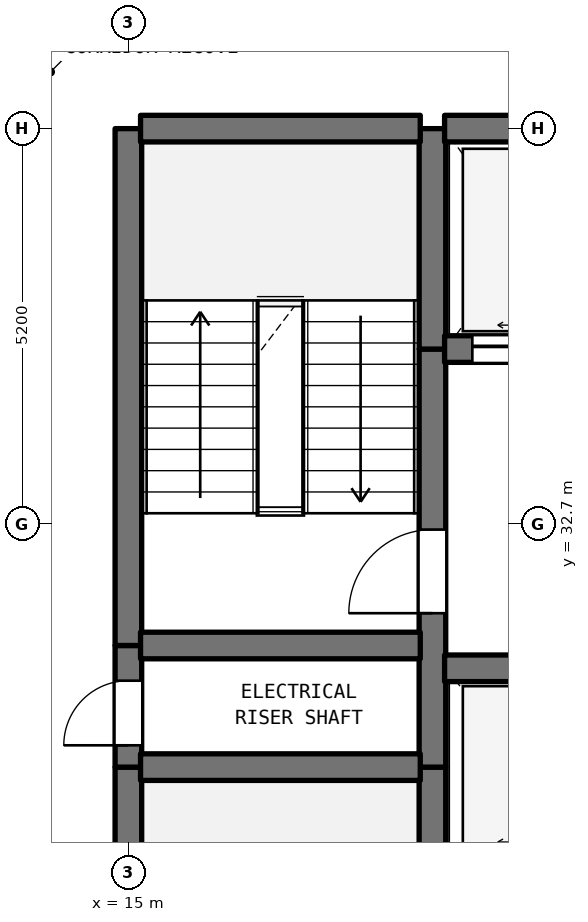
"""IFC4 building model, lengths in metres.
Left out: names, types, materials, properties, quantities, classifications, styles, units other than length and angle.
Written with IfcOpenShell. Run it as: python <this file> out.ifc"""

import sys

from ifc_helpers import new_model, si_unit, direction, frame, frame_2d, origin, place, context, subcontext, project, spatial, rectangle, extrude, element, fill, save


model = new_model("IFC4")
c1 = context("Model", 3, precision=1e-05, world=origin(), true_north=direction((0.0, 1.0)))
c2 = subcontext(c1, "Body", "Model", "MODEL_VIEW")
j1 = project(units=[si_unit("LENGTHUNIT", "METRE"), si_unit("PLANEANGLEUNIT", "RADIAN")], contexts=[c1])
p1 = place(None, origin())
s1 = spatial("IfcSite", under=j1, at=p1, CompositionType="ELEMENT")
p2 = place(p1, origin())
s2 = spatial("IfcBuilding", under=s1, at=p2, CompositionType="ELEMENT")
p3 = place(p2, frame((0.0, 0.0, 247.3)))
s3 = spatial("IfcBuildingStorey", under=s2, at=p3, CompositionType="ELEMENT", Elevation=247.3)
p4 = place(p3, frame((15.0, 22.7, 0.0), z_axis=(0.0, 0.0, 1.0), x_axis=(0.0, 1.0, 0.0)))
e1 = element("IfcWall", 1, at=p4, inside=s3, PredefinedType="SHEAR", context=c2, shape_type="SweptSolid", body=[
    extrude(rectangle(XDim=6.8, YDim=0.35, at=frame_2d((3.4, 0.0))), origin(), (0.0, 0.0, 1.0), 3.39),
])
p5 = place(p3, frame((15.0, 29.5, 0.0), z_axis=(0.0, 0.0, 1.0), x_axis=(0.0, 1.0, 0.0)))
e2 = element("IfcWall", 2, at=p5, inside=s3, PredefinedType="SHEAR", context=c2, shape_type="SweptSolid", body=[
    extrude(rectangle(XDim=1.6, YDim=0.35, at=frame_2d((0.8, 0.0))), origin(), (0.0, 0.0, 1.0), 3.39),
])
p6 = place(p5, frame((0.287, 0.0, 0.0)))
e3 = element("IfcOpeningElement", 3, at=p6, cuts=e2, PredefinedType="OPENING", context=c2, shape_type="SweptSolid", body=[
    extrude(rectangle(XDim=0.85, YDim=2.1, at=frame_2d((0.425, 1.05))), frame((0.0, 0.185, 0.0), z_axis=(0.0, -1.0, 0.0), x_axis=(1.0, 0.0, 0.0)), (0.0, 0.0, 1.0), 0.37),
])
p7 = place(p3, frame((15.0, 31.1, 0.0), z_axis=(0.0, 0.0, 1.0), x_axis=(0.0, 1.0, 0.0)))
e4 = element("IfcWall", 4, at=p7, inside=s3, PredefinedType="SHEAR", context=c2, shape_type="SweptSolid", body=[
    extrude(rectangle(XDim=6.8, YDim=0.35, at=frame_2d((3.4, 0.0))), origin(), (0.0, 0.0, 1.0), 3.39),
])
p8 = place(p3, frame((19.0, 28.2, 0.0), z_axis=(0.0, 0.0, 1.0), x_axis=(0.0, 1.0, 0.0)))
e5 = element("IfcWall", 5, at=p8, inside=s3, PredefinedType="SHEAR", context=c2, shape_type="SweptSolid", body=[
    extrude(rectangle(XDim=1.3, YDim=0.35, at=frame_2d((0.65, 0.0))), origin(), (0.0, 0.0, 1.0), 3.39),
])
p9 = place(p3, frame((19.0, 29.5, 0.0), z_axis=(0.0, 0.0, 1.0), x_axis=(0.0, 1.0, 0.0)))
e6 = element("IfcWall", 6, at=p9, inside=s3, PredefinedType="SHEAR", context=c2, shape_type="SweptSolid", body=[
    extrude(rectangle(XDim=5.5, YDim=0.35, at=frame_2d((2.75, 0.0))), origin(), (0.0, 0.0, 1.0), 3.39),
])
p10 = place(p9, frame((2.025, 0.0, 0.0)))
e7 = element("IfcOpeningElement", 7, at=p10, cuts=e6, PredefinedType="OPENING", context=c2, shape_type="SweptSolid", body=[
    extrude(rectangle(XDim=1.1, YDim=2.15, at=frame_2d((0.55, 1.075))), frame((0.0, 0.185, 0.0), z_axis=(0.0, -1.0, 0.0), x_axis=(1.0, 0.0, 0.0)), (0.0, 0.0, 1.0), 0.37),
])
p11 = place(p3, frame((19.0, 35.0, 0.0), z_axis=(0.0, 0.0, 1.0), x_axis=(0.0, 1.0, 0.0)))
e8 = element("IfcWall", 8, at=p11, inside=s3, PredefinedType="SHEAR", context=c2, shape_type="SweptSolid", body=[
    extrude(rectangle(XDim=2.9, YDim=0.35, at=frame_2d((1.45, 0.0))), origin(), (0.0, 0.0, 1.0), 3.39),
])
p12 = place(p3, frame((15.16, 29.5, 0.0), z_axis=(0.0, 0.0, 1.0), x_axis=(1.0, 0.0, 0.0)))
e9 = element("IfcWall", 9, at=p12, inside=s3, PredefinedType="SHEAR", context=c2, shape_type="SweptSolid", body=[
    extrude(rectangle(XDim=3.68, YDim=0.35, at=frame_2d((1.84, 0.0))), origin(), (0.0, 0.0, 1.0), 3.39),
])
p13 = place(p3, frame((19.16, 30.8, 0.0), z_axis=(0.0, 0.0, 1.0), x_axis=(1.0, 0.0, 0.0)))
e10 = element("IfcWall", 10, at=p13, inside=s3, PredefinedType="SHEAR", context=c2, shape_type="SweptSolid", body=[
    extrude(rectangle(XDim=4.48, YDim=0.35, at=frame_2d((2.24, 0.0))), origin(), (0.0, 0.0, 1.0), 3.39),
])
p14 = place(p3, frame((15.16, 31.1, 0.0), z_axis=(0.0, 0.0, 1.0), x_axis=(1.0, 0.0, 0.0)))
e11 = element("IfcWall", 11, at=p14, inside=s3, PredefinedType="SHEAR", context=c2, shape_type="SweptSolid", body=[
    extrude(rectangle(XDim=3.68, YDim=0.35, at=frame_2d((1.84, 0.0))), origin(), (0.0, 0.0, 1.0), 3.39),
])
p15 = place(p3, frame((19.16, 35.0, 0.0), z_axis=(0.0, 0.0, 1.0), x_axis=(1.0, 0.0, 0.0)))
e12 = element("IfcWall", 12, at=p15, inside=s3, PredefinedType="SHEAR", context=c2, shape_type="SweptSolid", body=[
    extrude(rectangle(XDim=4.48, YDim=0.35, at=frame_2d((2.24, 0.0))), origin(), (0.0, 0.0, 1.0), 3.39),
])
p16 = place(p15, frame((0.365, 0.0, 0.0)))
e13 = element("IfcOpeningElement", 13, at=p16, cuts=e12, PredefinedType="OPENING", context=c2, shape_type="SweptSolid", body=[
    extrude(rectangle(XDim=1.35, YDim=2.2, at=frame_2d((0.675, 1.1))), frame((0.0, 0.185, 0.0), z_axis=(0.0, -1.0, 0.0), x_axis=(1.0, 0.0, 0.0)), (0.0, 0.0, 1.0), 0.37),
])
p17 = place(p15, frame((2.765, 0.0, 0.0)))
e14 = element("IfcOpeningElement", 14, at=p17, cuts=e12, PredefinedType="OPENING", context=c2, shape_type="SweptSolid", body=[
    extrude(rectangle(XDim=1.35, YDim=2.2, at=frame_2d((0.675, 1.1))), frame((0.0, 0.185, 0.0), z_axis=(0.0, -1.0, 0.0), x_axis=(1.0, 0.0, 0.0)), (0.0, 0.0, 1.0), 0.37),
])
p18 = place(p3, frame((15.16, 37.9, 0.0), z_axis=(0.0, 0.0, 1.0), x_axis=(1.0, 0.0, 0.0)))
e15 = element("IfcWall", 15, at=p18, inside=s3, PredefinedType="SHEAR", context=c2, shape_type="SweptSolid", body=[
    extrude(rectangle(XDim=3.68, YDim=0.35, at=frame_2d((1.84, 0.0))), origin(), (0.0, 0.0, 1.0), 3.39),
])
p19 = place(p3, frame((19.16, 37.9, 0.0), z_axis=(0.0, 0.0, 1.0), x_axis=(1.0, 0.0, 0.0)))
e16 = element("IfcWall", 16, at=p19, inside=s3, PredefinedType="SHEAR", context=c2, shape_type="SweptSolid", body=[
    extrude(rectangle(XDim=4.48, YDim=0.35, at=frame_2d((2.24, 0.0))), origin(), (0.0, 0.0, 1.0), 3.39),
])
p20 = place(p6, origin())
e17 = element("IfcDoor", 17, at=p20, inside=s3, OperationType="SINGLE_SWING_LEFT", PredefinedType="DOOR", context=c2, shape_type="SweptSolid", body=[
    extrude(rectangle(XDim=0.85, YDim=2.1, at=frame_2d((0.425, 1.05))), frame((0.0, 0.025, 0.0), z_axis=(0.0, -1.0, 0.0), x_axis=(1.0, 0.0, 0.0)), (0.0, 0.0, 1.0), 0.05),
])
fill(e3, e17)
p21 = place(p10, origin())
e18 = element("IfcDoor", 18, at=p21, inside=s3, OperationType="SINGLE_SWING_LEFT", PredefinedType="DOOR", context=c2, shape_type="SweptSolid", body=[
    extrude(rectangle(XDim=1.1, YDim=2.15, at=frame_2d((0.55, 1.075))), frame((0.0, 0.025, 0.0), z_axis=(0.0, -1.0, 0.0), x_axis=(1.0, 0.0, 0.0)), (0.0, 0.0, 1.0), 0.05),
])
fill(e7, e18)
p22 = place(p16, origin())
e19 = element("IfcDoor", 19, at=p22, inside=s3, OperationType="DOUBLE_DOOR_SLIDING", PredefinedType="DOOR", context=c2, shape_type="SweptSolid", body=[
    extrude(rectangle(XDim=1.35, YDim=2.2, at=frame_2d((0.675, 1.1))), frame((0.0, 0.025, 0.0), z_axis=(0.0, -1.0, 0.0), x_axis=(1.0, 0.0, 0.0)), (0.0, 0.0, 1.0), 0.05),
])
fill(e13, e19)
save(model, sys.argv[1])
